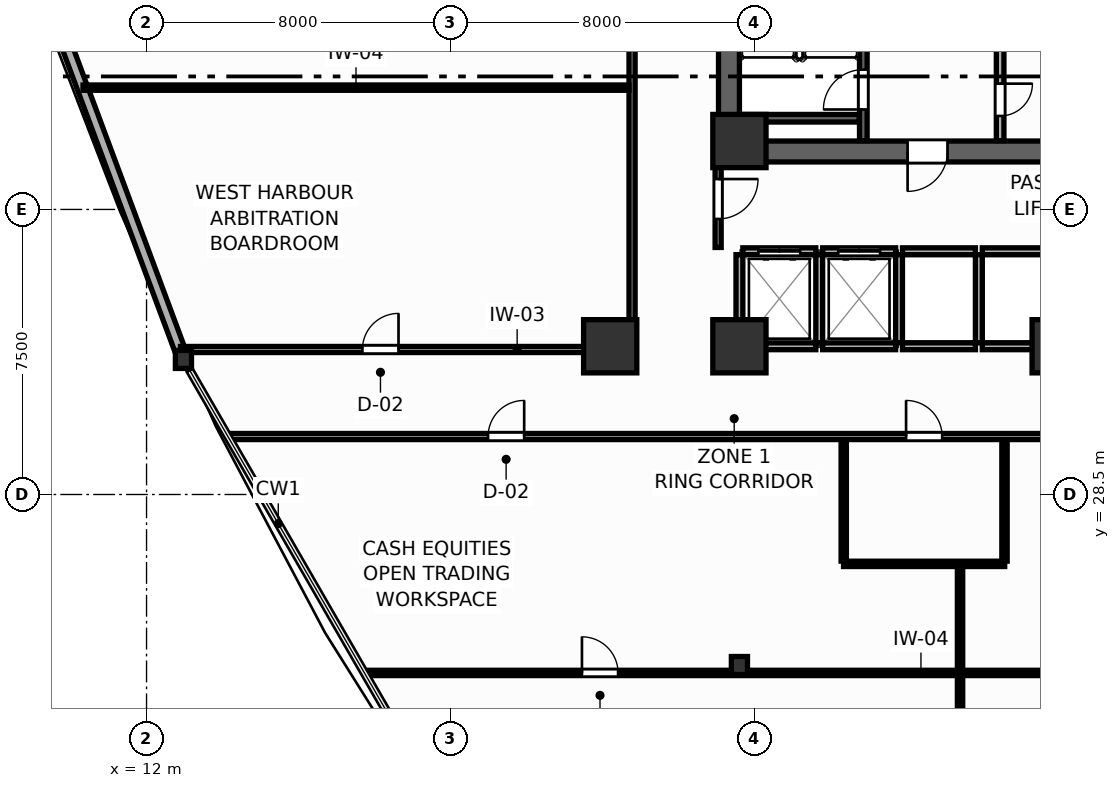
"""IFC4 building model, lengths in metres.
Left out: names, types, materials, properties, quantities, classifications, styles, units other than length and angle.
Written with IfcOpenShell. Run it as: python <this file> out.ifc"""

import sys

from ifc_helpers import new_model, si_unit, direction, frame, frame_2d, origin, origin_2d, place, context, subcontext, project, spatial, rectangle, i_section, extrude, source, transform, mapped, element, fill, save


model = new_model("IFC4")
c1 = context("Model", 3, precision=1e-05, world=origin(), true_north=direction((0.0, 1.0)))
c2 = subcontext(c1, "Body", "Model", "MODEL_VIEW")
j1 = project(units=[si_unit("LENGTHUNIT", "METRE"), si_unit("PLANEANGLEUNIT", "RADIAN")], contexts=[c1])
p1 = place(None, origin())
s1 = spatial("IfcSite", under=j1, at=p1, CompositionType="ELEMENT")
p2 = place(p1, origin())
s2 = spatial("IfcBuilding", under=s1, at=p2, CompositionType="ELEMENT")
p3 = place(p2, frame((0.0, 0.0, 24.0)))
s3 = spatial("IfcBuildingStorey", under=s2, at=p3, CompositionType="ELEMENT", Elevation=24.0)
p4 = place(p3, frame((27.05, 37.525, 0.0), z_axis=(0.0, 0.0, 1.0), x_axis=(1.0, 0.0, 0.0)))
e1 = element("IfcWall", 1, at=p4, inside=s3, PredefinedType="SHEAR", context=c2, shape_type="SweptSolid", body=[
    extrude(rectangle(XDim=17.9, YDim=0.55, at=frame_2d((8.95, 0.0))), origin(), (0.0, 0.0, 1.0), 3.9),
])
p5 = place(p4, frame((4.975, 0.0, 0.0)))
e2 = element("IfcOpeningElement", 2, at=p5, cuts=e1, PredefinedType="OPENING", context=c2, shape_type="SweptSolid", body=[
    extrude(rectangle(XDim=1.05, YDim=2.1, at=frame_2d((0.525, 1.05))), frame((0.0, 0.285, 0.0), z_axis=(0.0, -1.0, 0.0), x_axis=(1.0, 0.0, 0.0)), (0.0, 0.0, 1.0), 0.57),
])
p6 = place(p4, frame((11.875, 0.0, 0.0)))
e3 = element("IfcOpeningElement", 3, at=p6, cuts=e1, PredefinedType="OPENING", context=c2, shape_type="SweptSolid", body=[
    extrude(rectangle(XDim=1.05, YDim=2.1, at=frame_2d((0.525, 1.05))), frame((0.0, 0.285, 0.0), z_axis=(0.0, -1.0, 0.0), x_axis=(1.0, 0.0, 0.0)), (0.0, 0.0, 1.0), 0.57),
])
p7 = place(p3, frame((27.325, 37.8, 0.0), z_axis=(0.0, 0.0, 1.0), x_axis=(0.0, 1.0, 0.0)))
e4 = element("IfcWall", 4, at=p7, inside=s3, PredefinedType="SHEAR", context=c2, shape_type="SweptSolid", body=[
    extrude(rectangle(XDim=9.0, YDim=0.55, at=frame_2d((4.5, 0.0))), origin(), (0.0, 0.0, 1.0), 3.9),
])
m1 = source(origin(), c2, "Body", "SweptSolid", [
    extrude(rectangle(XDim=1.4, YDim=1.4, at=origin_2d()), origin(), (0.0, 0.0, 1.0), 3.9),
])
for number, where, z_axis, x_axis in (
    (5, (27.6, 37.8, 0.0), (0.0, 0.0, 1.0), (1.0, 0.0, 0.0)),
    (6, (27.6, 32.4, 0.0), (0.0, 0.0, 1.0), (1.0, 0.0, 0.0)),
    (7, (36.0, 32.4, 0.0), (0.0, 0.0, 1.0), (1.0, 0.0, 0.0)),
    (8, (24.2, 32.4, 0.0), (0.0, 0.0, 1.0), (1.0, 0.0, 0.0)),
):
    element("IfcColumn", number, at=place(p3, frame(where, z_axis=z_axis, x_axis=x_axis)), inside=s3, PredefinedType="COLUMN", context=c2, shape_type="MappedRepresentation", body=[
        mapped(m1, transform((0.0, 0.0, 0.0), scale=1.0)),
    ])
m2 = source(origin(), c2, "Body", "SweptSolid", [
    extrude(i_section(OverallWidth=0.424, OverallDepth=0.474, WebThickness=0.045, FlangeThickness=0.072, FilletRadius=0.015, at=origin_2d()), origin(), (0.0, 0.0, 1.0), 3.9),
])
for number, where, z_axis, x_axis in (
    (9, (27.6, 24.0, 0.0), (0.0, 0.0, 1.0), (1.0, 0.0, 0.0)),
    (10, (12.97, 32.054, 0.0), (0.0, 0.0, 1.0), (1.0, 0.0, 0.0)),
):
    element("IfcColumn", number, at=place(p3, frame(where, z_axis=z_axis, x_axis=x_axis)), inside=s3, PredefinedType="COLUMN", context=c2, shape_type="MappedRepresentation", body=[
        mapped(m2, transform((0.0, 0.0, 0.0), scale=1.0)),
    ])
p8 = place(p3, frame((6.302, 49.975, 0.0), z_axis=(0.0, 0.0, 1.0), x_axis=(0.348763587367, -0.937210734108, 0.0)))
e11 = element("IfcWall", 11, at=p8, inside=s3, PredefinedType="SOLIDWALL", context=c2, shape_type="SweptSolid", body=[
    extrude(rectangle(XDim=18.863, YDim=0.28, at=frame_2d((9.432, 0.0))), origin(), (0.0, 0.0, 1.0), 3.23),
])
p9 = place(p3, frame((30.86, 37.81, 0.0), z_axis=(0.0, 0.0, 1.0), x_axis=(0.0, 1.0, 0.0)))
e12 = element("IfcWall", 12, at=p9, inside=s3, PredefinedType="SHEAR", context=c2, shape_type="SweptSolid", body=[
    extrude(rectangle(XDim=8.98, YDim=0.2, at=frame_2d((4.49, 0.0))), origin(), (0.0, 0.0, 1.0), 3.9),
])
p10 = place(p9, frame((0.82, 0.0, 0.0)))
e13 = element("IfcOpeningElement", 13, at=p10, cuts=e12, PredefinedType="OPENING", context=c2, shape_type="SweptSolid", body=[
    extrude(rectangle(XDim=1.05, YDim=2.1, at=frame_2d((0.525, 1.05))), frame((0.0, 0.11, 0.0), z_axis=(0.0, -1.0, 0.0), x_axis=(1.0, 0.0, 0.0)), (0.0, 0.0, 1.0), 0.22),
])
p11 = place(p3, frame((27.61, 38.4, 0.0), z_axis=(0.0, 0.0, 1.0), x_axis=(1.0, 0.0, 0.0)))
e14 = element("IfcWall", 14, at=p11, inside=s3, PredefinedType="SHEAR", context=c2, shape_type="SweptSolid", body=[
    extrude(rectangle(XDim=3.14, YDim=0.2, at=frame_2d((1.57, 0.0))), origin(), (0.0, 0.0, 1.0), 3.9),
])
p12 = place(p3, frame((34.46, 37.81, 0.0), z_axis=(0.0, 0.0, 1.0), x_axis=(0.0, 1.0, 0.0)))
e15 = element("IfcWall", 15, at=p12, inside=s3, PredefinedType="PARTITIONING", context=c2, shape_type="SweptSolid", body=[
    extrude(rectangle(XDim=8.98, YDim=0.2, at=frame_2d((4.49, 0.0))), origin(), (0.0, 0.0, 1.0), 3.68),
])
p13 = place(p12, frame((0.65, 0.0, 0.0)))
e16 = element("IfcOpeningElement", 16, at=p13, cuts=e15, PredefinedType="OPENING", context=c2, shape_type="SweptSolid", body=[
    extrude(rectangle(XDim=0.85, YDim=2.05, at=frame_2d((0.425, 1.025))), frame((0.0, 0.11, 0.0), z_axis=(0.0, -1.0, 0.0), x_axis=(1.0, 0.0, 0.0)), (0.0, 0.0, 1.0), 0.22),
])
p14 = place(p3, frame((27.69, 34.9, 0.0), z_axis=(0.0, 0.0, 1.0), x_axis=(1.0, 0.0, 0.0)))
e17 = element("IfcWall", 17, at=p14, inside=s3, PredefinedType="PARTITIONING", context=c2, shape_type="SweptSolid", body=[
    extrude(rectangle(XDim=1.92, YDim=0.18, at=frame_2d((0.96, 0.0))), origin(), (0.0, 0.0, 1.0), 3.68),
])
p15 = place(p14, frame((0.41, 0.0, 0.0)))
e18 = element("IfcOpeningElement", 18, at=p15, cuts=e17, PredefinedType="OPENING", context=c2, shape_type="SweptSolid", body=[
    extrude(rectangle(XDim=1.1, YDim=2.1, at=frame_2d((0.55, 1.05))), frame((0.0, 0.1, 0.0), z_axis=(0.0, -1.0, 0.0), x_axis=(1.0, 0.0, 0.0)), (0.0, 0.0, 1.0), 0.2),
])
p16 = place(p3, frame((27.69, 32.4, 0.0), z_axis=(0.0, 0.0, 1.0), x_axis=(1.0, 0.0, 0.0)))
e19 = element("IfcWall", 19, at=p16, inside=s3, PredefinedType="PARTITIONING", context=c2, shape_type="SweptSolid", body=[
    extrude(rectangle(XDim=1.92, YDim=0.18, at=frame_2d((0.96, 0.0))), origin(), (0.0, 0.0, 1.0), 3.18),
])
p17 = place(p3, frame((27.6, 32.49, 0.0), z_axis=(0.0, 0.0, 1.0), x_axis=(0.0, 1.0, 0.0)))
e20 = element("IfcWall", 20, at=p17, inside=s3, PredefinedType="PARTITIONING", context=c2, shape_type="SweptSolid", body=[
    extrude(rectangle(XDim=2.32, YDim=0.18, at=frame_2d((1.16, 0.0))), origin(), (0.0, 0.0, 1.0), 3.68),
])
p18 = place(p3, frame((29.79, 34.9, 0.0), z_axis=(0.0, 0.0, 1.0), x_axis=(1.0, 0.0, 0.0)))
e21 = element("IfcWall", 21, at=p18, inside=s3, PredefinedType="PARTITIONING", context=c2, shape_type="SweptSolid", body=[
    extrude(rectangle(XDim=1.92, YDim=0.18, at=frame_2d((0.96, 0.0))), origin(), (0.0, 0.0, 1.0), 3.68),
])
p19 = place(p18, frame((0.41, 0.0, 0.0)))
e22 = element("IfcOpeningElement", 22, at=p19, cuts=e21, PredefinedType="OPENING", context=c2, shape_type="SweptSolid", body=[
    extrude(rectangle(XDim=1.1, YDim=2.1, at=frame_2d((0.55, 1.05))), frame((0.0, 0.1, 0.0), z_axis=(0.0, -1.0, 0.0), x_axis=(1.0, 0.0, 0.0)), (0.0, 0.0, 1.0), 0.2),
])
p20 = place(p3, frame((29.79, 32.4, 0.0), z_axis=(0.0, 0.0, 1.0), x_axis=(1.0, 0.0, 0.0)))
e23 = element("IfcWall", 23, at=p20, inside=s3, PredefinedType="PARTITIONING", context=c2, shape_type="SweptSolid", body=[
    extrude(rectangle(XDim=1.92, YDim=0.18, at=frame_2d((0.96, 0.0))), origin(), (0.0, 0.0, 1.0), 3.18),
])
p21 = place(p3, frame((29.7, 32.49, 0.0), z_axis=(0.0, 0.0, 1.0), x_axis=(0.0, 1.0, 0.0)))
e24 = element("IfcWall", 24, at=p21, inside=s3, PredefinedType="PARTITIONING", context=c2, shape_type="SweptSolid", body=[
    extrude(rectangle(XDim=2.32, YDim=0.18, at=frame_2d((1.16, 0.0))), origin(), (0.0, 0.0, 1.0), 3.68),
])
p22 = place(p3, frame((31.89, 34.9, 0.0), z_axis=(0.0, 0.0, 1.0), x_axis=(1.0, 0.0, 0.0)))
e25 = element("IfcWall", 25, at=p22, inside=s3, PredefinedType="PARTITIONING", context=c2, shape_type="SweptSolid", body=[
    extrude(rectangle(XDim=1.92, YDim=0.18, at=frame_2d((0.96, 0.0))), origin(), (0.0, 0.0, 1.0), 3.68),
])
p23 = place(p3, frame((31.89, 32.4, 0.0), z_axis=(0.0, 0.0, 1.0), x_axis=(1.0, 0.0, 0.0)))
e26 = element("IfcWall", 26, at=p23, inside=s3, PredefinedType="PARTITIONING", context=c2, shape_type="SweptSolid", body=[
    extrude(rectangle(XDim=1.92, YDim=0.18, at=frame_2d((0.96, 0.0))), origin(), (0.0, 0.0, 1.0), 3.18),
])
p24 = place(p3, frame((31.8, 32.49, 0.0), z_axis=(0.0, 0.0, 1.0), x_axis=(0.0, 1.0, 0.0)))
e27 = element("IfcWall", 27, at=p24, inside=s3, PredefinedType="PARTITIONING", context=c2, shape_type="SweptSolid", body=[
    extrude(rectangle(XDim=2.32, YDim=0.18, at=frame_2d((1.16, 0.0))), origin(), (0.0, 0.0, 1.0), 3.68),
])
p25 = place(p3, frame((33.99, 34.9, 0.0), z_axis=(0.0, 0.0, 1.0), x_axis=(1.0, 0.0, 0.0)))
e28 = element("IfcWall", 28, at=p25, inside=s3, PredefinedType="PARTITIONING", context=c2, shape_type="SweptSolid", body=[
    extrude(rectangle(XDim=1.92, YDim=0.18, at=frame_2d((0.96, 0.0))), origin(), (0.0, 0.0, 1.0), 3.68),
])
p26 = place(p3, frame((33.99, 32.4, 0.0), z_axis=(0.0, 0.0, 1.0), x_axis=(1.0, 0.0, 0.0)))
e29 = element("IfcWall", 29, at=p26, inside=s3, PredefinedType="PARTITIONING", context=c2, shape_type="SweptSolid", body=[
    extrude(rectangle(XDim=1.92, YDim=0.18, at=frame_2d((0.96, 0.0))), origin(), (0.0, 0.0, 1.0), 3.18),
])
p27 = place(p3, frame((33.9, 32.49, 0.0), z_axis=(0.0, 0.0, 1.0), x_axis=(0.0, 1.0, 0.0)))
e30 = element("IfcWall", 30, at=p27, inside=s3, PredefinedType="PARTITIONING", context=c2, shape_type="SweptSolid", body=[
    extrude(rectangle(XDim=2.32, YDim=0.18, at=frame_2d((1.16, 0.0))), origin(), (0.0, 0.0, 1.0), 3.68),
])
p28 = place(p3, frame((27.04, 35.0, 0.0), z_axis=(0.0, 0.0, 1.0), x_axis=(0.0, 1.0, 0.0)))
e31 = element("IfcWall", 31, at=p28, inside=s3, PredefinedType="PARTITIONING", context=c2, shape_type="SweptSolid", body=[
    extrude(rectangle(XDim=2.65, YDim=0.16, at=frame_2d((1.325, 0.0))), origin(), (0.0, 0.0, 1.0), 3.68),
])
p29 = place(p28, frame((0.75, 0.0, 0.0)))
e32 = element("IfcOpeningElement", 32, at=p29, cuts=e31, PredefinedType="OPENING", context=c2, shape_type="SweptSolid", body=[
    extrude(rectangle(XDim=1.05, YDim=2.1, at=frame_2d((0.525, 1.05))), frame((0.0, 0.09, 0.0), z_axis=(0.0, -1.0, 0.0), x_axis=(1.0, 0.0, 0.0)), (0.0, 0.0, 1.0), 0.18),
])
p30 = place(p3, frame((14.162, 30.025, 0.0), z_axis=(0.0, 0.0, 1.0), x_axis=(1.0, 0.0, 0.0)))
e33 = element("IfcWall", 33, at=p30, inside=s3, PredefinedType="PARTITIONING", context=c2, shape_type="SweptSolid", body=[
    extrude(rectangle(XDim=43.676, YDim=0.16, at=frame_2d((21.838, 0.0))), origin(), (0.0, 0.0, 1.0), 3.68),
])
p31 = place(p30, frame((17.823, 0.0, 0.0)))
e34 = element("IfcOpeningElement", 34, at=p31, cuts=e33, PredefinedType="OPENING", context=c2, shape_type="SweptSolid", body=[
    extrude(rectangle(XDim=0.95, YDim=2.05, at=frame_2d((0.475, 1.025))), frame((0.0, 0.09, 0.0), z_axis=(0.0, -1.0, 0.0), x_axis=(1.0, 0.0, 0.0)), (0.0, 0.0, 1.0), 0.18),
])
p32 = place(p30, frame((6.824, 0.0, 0.0)))
e35 = element("IfcOpeningElement", 35, at=p32, cuts=e33, PredefinedType="OPENING", context=c2, shape_type="SweptSolid", body=[
    extrude(rectangle(XDim=0.95, YDim=2.05, at=frame_2d((0.475, 1.025))), frame((0.0, 0.09, 0.0), z_axis=(0.0, -1.0, 0.0), x_axis=(1.0, 0.0, 0.0)), (0.0, 0.0, 1.0), 0.18),
])
p33 = place(p30, frame((27.146, 0.0, 0.0)))
e36 = element("IfcOpeningElement", 36, at=p33, cuts=e33, PredefinedType="OPENING", context=c2, shape_type="SweptSolid", body=[
    extrude(rectangle(XDim=0.95, YDim=2.05, at=frame_2d((0.475, 1.025))), frame((0.0, 0.09, 0.0), z_axis=(0.0, -1.0, 0.0), x_axis=(1.0, 0.0, 0.0)), (0.0, 0.0, 1.0), 0.18),
])
p34 = place(p3, frame((24.775, 32.31, 0.0), z_axis=(0.0, 0.0, 1.0), x_axis=(0.0, 1.0, 0.0)))
e37 = element("IfcWall", 37, at=p34, inside=s3, PredefinedType="PARTITIONING", context=c2, shape_type="SweptSolid", body=[
    extrude(rectangle(XDim=25.059, YDim=0.16, at=frame_2d((12.529, 0.0))), origin(), (0.0, 0.0, 1.0), 3.68),
])
p35 = place(p34, frame((17.287, 0.0, 0.0)))
e38 = element("IfcOpeningElement", 38, at=p35, cuts=e37, PredefinedType="OPENING", context=c2, shape_type="SweptSolid", body=[
    extrude(rectangle(XDim=0.95, YDim=2.05, at=frame_2d((0.475, 1.025))), frame((0.0, 0.09, 0.0), z_axis=(0.0, -1.0, 0.0), x_axis=(1.0, 0.0, 0.0)), (0.0, 0.0, 1.0), 0.18),
])
p36 = place(p3, frame((12.893, 32.315, 0.0), z_axis=(0.0, 0.0, 1.0), x_axis=(1.0, 0.0, 0.0)))
e39 = element("IfcWall", 39, at=p36, inside=s3, PredefinedType="PARTITIONING", context=c2, shape_type="SweptSolid", body=[
    extrude(rectangle(XDim=11.8, YDim=0.16, at=frame_2d((5.9, 0.0))), origin(), (0.0, 0.0, 1.0), 3.18),
])
p37 = place(p36, frame((4.787, 0.0, 0.0)))
e40 = element("IfcOpeningElement", 40, at=p37, cuts=e39, PredefinedType="OPENING", context=c2, shape_type="SweptSolid", body=[
    extrude(rectangle(XDim=0.95, YDim=2.05, at=frame_2d((0.475, 1.025))), frame((0.0, 0.09, 0.0), z_axis=(0.0, -1.0, 0.0), x_axis=(1.0, 0.0, 0.0)), (0.0, 0.0, 1.0), 0.18),
])
p38 = place(p3, frame((17.753, 23.805, 0.0), z_axis=(0.0, 0.0, 1.0), x_axis=(1.0, 0.0, 0.0)))
e41 = element("IfcWall", 41, at=p38, inside=s3, PredefinedType="PARTITIONING", context=c2, shape_type="SweptSolid", body=[
    extrude(rectangle(XDim=36.494, YDim=0.14, at=frame_2d((18.247, 0.0))), origin(), (0.0, 0.0, 1.0), 3.18),
])
p39 = place(p38, frame((5.704, 0.0, 0.0)))
e42 = element("IfcOpeningElement", 42, at=p39, cuts=e41, PredefinedType="OPENING", context=c2, shape_type="SweptSolid", body=[
    extrude(rectangle(XDim=0.95, YDim=2.05, at=frame_2d((0.475, 1.025))), frame((0.0, 0.08, 0.0), z_axis=(0.0, -1.0, 0.0), x_axis=(1.0, 0.0, 0.0)), (0.0, 0.0, 1.0), 0.16),
])
p40 = place(p38, frame((22.593, 0.0, 0.0)))
e43 = element("IfcOpeningElement", 43, at=p40, cuts=e41, PredefinedType="OPENING", context=c2, shape_type="SweptSolid", body=[
    extrude(rectangle(XDim=0.95, YDim=2.05, at=frame_2d((0.475, 1.025))), frame((0.0, 0.08, 0.0), z_axis=(0.0, -1.0, 0.0), x_axis=(1.0, 0.0, 0.0)), (0.0, 0.0, 1.0), 0.16),
])
p41 = place(p3, frame((33.405, 3.129, 0.0), z_axis=(0.0, 0.0, 1.0), x_axis=(0.0, 1.0, 0.0)))
e44 = element("IfcWall", 44, at=p41, inside=s3, PredefinedType="PARTITIONING", context=c2, shape_type="SweptSolid", body=[
    extrude(rectangle(XDim=23.561, YDim=0.14, at=frame_2d((11.78, 0.0))), origin(), (0.0, 0.0, 1.0), 3.18),
])
p42 = place(p3, frame((10.329, 39.205, 0.0), z_axis=(0.0, 0.0, 1.0), x_axis=(1.0, 0.0, 0.0)))
e45 = element("IfcWall", 45, at=p42, inside=s3, PredefinedType="PARTITIONING", context=c2, shape_type="SweptSolid", body=[
    extrude(rectangle(XDim=14.364, YDim=0.14, at=frame_2d((7.182, 0.0))), origin(), (0.0, 0.0, 1.0), 3.68),
])
p43 = place(p3, frame((30.34, 26.675, 0.0), z_axis=(0.0, 0.0, 1.0), x_axis=(1.0, 0.0, 0.0)))
e46 = element("IfcWall", 46, at=p43, inside=s3, PredefinedType="PARTITIONING", context=c2, shape_type="SweptSolid", body=[
    extrude(rectangle(XDim=4.24, YDim=0.14, at=frame_2d((2.12, 0.0))), origin(), (0.0, 0.0, 1.0), 3.68),
])
for number, where, z_axis, x_axis in (
    (47, (30.345, 26.747, 0.0), (0.0, 0.0, 1.0), (0.0, 1.0, 0.0)),
    (48, (34.575, 26.747, 0.0), (0.0, 0.0, 1.0), (0.0, 1.0, 0.0)),
):
    element("IfcWall", number, at=place(p3, frame(where, z_axis=z_axis, x_axis=x_axis)), inside=s3, PredefinedType="PARTITIONING", context=c2, shape_type="SweptSolid", body=[
        extrude(rectangle(XDim=3.196, YDim=0.14, at=frame_2d((1.598, 0.0))), origin(), (0.0, 0.0, 1.0), 3.68),
    ])
p44 = place(p10, origin())
e49 = element("IfcDoor", 49, at=p44, inside=s3, OperationType="SINGLE_SWING_LEFT", PredefinedType="DOOR", context=c2, shape_type="SweptSolid", body=[
    extrude(rectangle(XDim=1.05, YDim=2.1, at=frame_2d((0.525, 1.05))), frame((0.0, 0.025, 0.0), z_axis=(0.0, -1.0, 0.0), x_axis=(1.0, 0.0, 0.0)), (0.0, 0.0, 1.0), 0.05),
])
fill(e13, e49)
p45 = place(p13, frame((0.85, 0.0, 0.0), z_axis=(0.0, 0.0, 1.0), x_axis=(-1.0, 0.0, 0.0)))
e50 = element("IfcDoor", 50, at=p45, inside=s3, OperationType="SINGLE_SWING_LEFT", PredefinedType="DOOR", context=c2, shape_type="SweptSolid", body=[
    extrude(rectangle(XDim=0.85, YDim=2.05, at=frame_2d((0.425, 1.025))), frame((0.0, 0.025, 0.0), z_axis=(0.0, -1.0, 0.0), x_axis=(1.0, 0.0, 0.0)), (0.0, 0.0, 1.0), 0.05),
])
fill(e16, e50)
p46 = place(p15, origin())
e51 = element("IfcDoor", 51, at=p46, inside=s3, OperationType="DOUBLE_DOOR_SLIDING", PredefinedType="DOOR", context=c2, shape_type="SweptSolid", body=[
    extrude(rectangle(XDim=1.1, YDim=2.1, at=frame_2d((0.55, 1.05))), frame((0.0, 0.025, 0.0), z_axis=(0.0, -1.0, 0.0), x_axis=(1.0, 0.0, 0.0)), (0.0, 0.0, 1.0), 0.05),
])
fill(e18, e51)
p47 = place(p19, origin())
e52 = element("IfcDoor", 52, at=p47, inside=s3, OperationType="DOUBLE_DOOR_SLIDING", PredefinedType="DOOR", context=c2, shape_type="SweptSolid", body=[
    extrude(rectangle(XDim=1.1, YDim=2.1, at=frame_2d((0.55, 1.05))), frame((0.0, 0.025, 0.0), z_axis=(0.0, -1.0, 0.0), x_axis=(1.0, 0.0, 0.0)), (0.0, 0.0, 1.0), 0.05),
])
fill(e22, e52)
p48 = place(p29, frame((1.05, 0.0, 0.0), z_axis=(0.0, 0.0, 1.0), x_axis=(-1.0, 0.0, 0.0)))
e53 = element("IfcDoor", 53, at=p48, inside=s3, OperationType="SINGLE_SWING_LEFT", PredefinedType="DOOR", context=c2, shape_type="SweptSolid", body=[
    extrude(rectangle(XDim=1.05, YDim=2.1, at=frame_2d((0.525, 1.05))), frame((0.0, 0.025, 0.0), z_axis=(0.0, -1.0, 0.0), x_axis=(1.0, 0.0, 0.0)), (0.0, 0.0, 1.0), 0.05),
])
fill(e32, e53)
p49 = place(p31, origin())
e54 = element("IfcDoor", 54, at=p49, inside=s3, OperationType="SINGLE_SWING_LEFT", PredefinedType="DOOR", context=c2, shape_type="SweptSolid", body=[
    extrude(rectangle(XDim=0.95, YDim=2.05, at=frame_2d((0.475, 1.025))), frame((0.0, 0.025, 0.0), z_axis=(0.0, -1.0, 0.0), x_axis=(1.0, 0.0, 0.0)), (0.0, 0.0, 1.0), 0.05),
])
fill(e34, e54)
p50 = place(p32, origin())
e55 = element("IfcDoor", 55, at=p50, inside=s3, OperationType="SINGLE_SWING_RIGHT", PredefinedType="DOOR", context=c2, shape_type="SweptSolid", body=[
    extrude(rectangle(XDim=0.95, YDim=2.05, at=frame_2d((0.475, 1.025))), frame((0.0, 0.025, 0.0), z_axis=(0.0, -1.0, 0.0), x_axis=(1.0, 0.0, 0.0)), (0.0, 0.0, 1.0), 0.05),
])
fill(e35, e55)
p51 = place(p37, origin())
e56 = element("IfcDoor", 56, at=p51, inside=s3, OperationType="SINGLE_SWING_RIGHT", PredefinedType="DOOR", context=c2, shape_type="SweptSolid", body=[
    extrude(rectangle(XDim=0.95, YDim=2.05, at=frame_2d((0.475, 1.025))), frame((0.0, 0.025, 0.0), z_axis=(0.0, -1.0, 0.0), x_axis=(1.0, 0.0, 0.0)), (0.0, 0.0, 1.0), 0.05),
])
fill(e40, e56)
p52 = place(p39, origin())
e57 = element("IfcDoor", 57, at=p52, inside=s3, OperationType="SINGLE_SWING_LEFT", PredefinedType="DOOR", context=c2, shape_type="SweptSolid", body=[
    extrude(rectangle(XDim=0.95, YDim=2.05, at=frame_2d((0.475, 1.025))), frame((0.0, 0.025, 0.0), z_axis=(0.0, -1.0, 0.0), x_axis=(1.0, 0.0, 0.0)), (0.0, 0.0, 1.0), 0.05),
])
fill(e42, e57)
p53 = place(p5, frame((1.05, 0.0, 0.0), z_axis=(0.0, 0.0, 1.0), x_axis=(-1.0, 0.0, 0.0)))
e58 = element("IfcDoor", 58, at=p53, inside=s3, OperationType="SINGLE_SWING_RIGHT", PredefinedType="DOOR", context=c2, shape_type="SweptSolid", body=[
    extrude(rectangle(XDim=1.05, YDim=2.1, at=frame_2d((0.525, 1.05))), frame((0.0, 0.025, 0.0), z_axis=(0.0, -1.0, 0.0), x_axis=(1.0, 0.0, 0.0)), (0.0, 0.0, 1.0), 0.05),
])
fill(e2, e58)
save(model, sys.argv[1])
